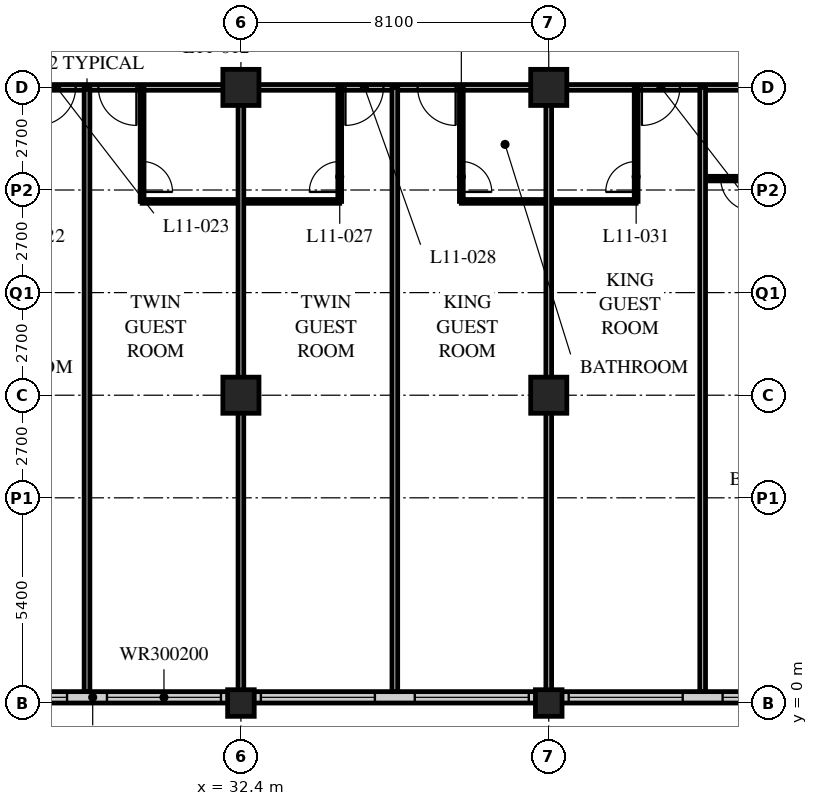
"""IFC4 building model, lengths in metres.
Left out: names, types, materials, properties, quantities, classifications, styles, units other than length and angle.
Written with IfcOpenShell. Run it as: python <this file> out.ifc"""

import sys

from ifc_helpers import new_model, si_unit, direction, frame, frame_2d, origin, origin_2d, place, context, subcontext, project, spatial, rectangle, hollow_rectangle, extrude, element, fill, save


model = new_model("IFC4")
c1 = context("Model", 3, precision=1e-05, world=origin(), true_north=direction((0.0, 1.0)))
c2 = subcontext(c1, "Body", "Model", "MODEL_VIEW")
j1 = project(units=[si_unit("LENGTHUNIT", "METRE"), si_unit("PLANEANGLEUNIT", "RADIAN")], contexts=[c1])
p1 = place(None, origin())
s1 = spatial("IfcSite", under=j1, at=p1, CompositionType="ELEMENT")
p2 = place(p1, origin())
s2 = spatial("IfcBuilding", under=s1, at=p2, CompositionType="ELEMENT")
p3 = place(p2, frame((0.0, 0.0, 50.0)))
s3 = spatial("IfcBuildingStorey", under=s2, at=p3, CompositionType="ELEMENT", Elevation=50.0)
p4 = place(p3, frame((32.4, 0.0, 0.0), z_axis=(0.0, 0.0, 1.0), x_axis=(1.0, 0.0, 0.0)))
e1 = element("IfcColumn", 1, at=p4, inside=s3, PredefinedType="COLUMN", context=c2, shape_type="SweptSolid", body=[
    extrude(hollow_rectangle(XDim=0.7, YDim=0.7, WallThickness=0.06, at=origin_2d()), origin(), (0.0, 0.0, 1.0), 3.4),
])
for number, where, z_axis, x_axis in (
    (2, (32.4, 8.1, 0.0), (0.0, 0.0, 1.0), (1.0, 0.0, 0.0)),
    (3, (32.4, 16.2, 0.0), (0.0, 0.0, 1.0), (1.0, 0.0, 0.0)),
):
    element("IfcColumn", number, at=place(p3, frame(where, z_axis=z_axis, x_axis=x_axis)), inside=s3, PredefinedType="COLUMN", context=c2, shape_type="SweptSolid", body=[
        extrude(hollow_rectangle(XDim=0.95, YDim=0.95, WallThickness=0.095, at=origin_2d()), origin(), (0.0, 0.0, 1.0), 3.4),
    ])
p5 = place(p3, frame((40.5, 0.0, 0.0), z_axis=(0.0, 0.0, 1.0), x_axis=(1.0, 0.0, 0.0)))
e4 = element("IfcColumn", 4, at=p5, inside=s3, PredefinedType="COLUMN", context=c2, shape_type="SweptSolid", body=[
    extrude(hollow_rectangle(XDim=0.7, YDim=0.7, WallThickness=0.06, at=origin_2d()), origin(), (0.0, 0.0, 1.0), 3.4),
])
for number, where, z_axis, x_axis in (
    (5, (40.5, 8.1, 0.0), (0.0, 0.0, 1.0), (1.0, 0.0, 0.0)),
    (6, (40.5, 16.2, 0.0), (0.0, 0.0, 1.0), (1.0, 0.0, 0.0)),
):
    element("IfcColumn", number, at=place(p3, frame(where, z_axis=z_axis, x_axis=x_axis)), inside=s3, PredefinedType="COLUMN", context=c2, shape_type="SweptSolid", body=[
        extrude(hollow_rectangle(XDim=0.95, YDim=0.95, WallThickness=0.095, at=origin_2d()), origin(), (0.0, 0.0, 1.0), 3.4),
    ])
p6 = place(p3, frame((8.4, 0.15, 0.0), z_axis=(0.0, 0.0, 1.0), x_axis=(1.0, 0.0, 0.0)))
e7 = element("IfcWall", 7, at=p6, inside=s3, PredefinedType="SOLIDWALL", context=c2, shape_type="SweptSolid", body=[
    extrude(rectangle(XDim=40.2, YDim=0.3, at=frame_2d((20.1, 0.0))), origin(), (0.0, 0.0, 1.0), 3.19),
])
p7 = place(p6, frame((0.225, 0.0, 0.9)))
e8 = element("IfcOpeningElement", 8, at=p7, cuts=e7, PredefinedType="OPENING", context=c2, shape_type="SweptSolid", body=[
    extrude(rectangle(XDim=3.0, YDim=2.0, at=frame_2d((1.5, 1.0))), frame((0.0, 0.16, 0.0), z_axis=(0.0, -1.0, 0.0), x_axis=(1.0, 0.0, 0.0)), (0.0, 0.0, 1.0), 0.32),
])
p8 = place(p6, frame((4.275, 0.0, 0.9)))
e9 = element("IfcOpeningElement", 9, at=p8, cuts=e7, PredefinedType="OPENING", context=c2, shape_type="SweptSolid", body=[
    extrude(rectangle(XDim=3.0, YDim=2.0, at=frame_2d((1.5, 1.0))), frame((0.0, 0.16, 0.0), z_axis=(0.0, -1.0, 0.0), x_axis=(1.0, 0.0, 0.0)), (0.0, 0.0, 1.0), 0.32),
])
p9 = place(p6, frame((8.325, 0.0, 0.9)))
e10 = element("IfcOpeningElement", 10, at=p9, cuts=e7, PredefinedType="OPENING", context=c2, shape_type="SweptSolid", body=[
    extrude(rectangle(XDim=3.0, YDim=2.0, at=frame_2d((1.5, 1.0))), frame((0.0, 0.16, 0.0), z_axis=(0.0, -1.0, 0.0), x_axis=(1.0, 0.0, 0.0)), (0.0, 0.0, 1.0), 0.32),
])
p10 = place(p6, frame((12.375, 0.0, 0.9)))
e11 = element("IfcOpeningElement", 11, at=p10, cuts=e7, PredefinedType="OPENING", context=c2, shape_type="SweptSolid", body=[
    extrude(rectangle(XDim=3.0, YDim=2.0, at=frame_2d((1.5, 1.0))), frame((0.0, 0.16, 0.0), z_axis=(0.0, -1.0, 0.0), x_axis=(1.0, 0.0, 0.0)), (0.0, 0.0, 1.0), 0.32),
])
p11 = place(p6, frame((16.425, 0.0, 0.9)))
e12 = element("IfcOpeningElement", 12, at=p11, cuts=e7, PredefinedType="OPENING", context=c2, shape_type="SweptSolid", body=[
    extrude(rectangle(XDim=3.0, YDim=2.0, at=frame_2d((1.5, 1.0))), frame((0.0, 0.16, 0.0), z_axis=(0.0, -1.0, 0.0), x_axis=(1.0, 0.0, 0.0)), (0.0, 0.0, 1.0), 0.32),
])
p12 = place(p6, frame((20.475, 0.0, 0.9)))
e13 = element("IfcOpeningElement", 13, at=p12, cuts=e7, PredefinedType="OPENING", context=c2, shape_type="SweptSolid", body=[
    extrude(rectangle(XDim=3.0, YDim=2.0, at=frame_2d((1.5, 1.0))), frame((0.0, 0.16, 0.0), z_axis=(0.0, -1.0, 0.0), x_axis=(1.0, 0.0, 0.0)), (0.0, 0.0, 1.0), 0.32),
])
p13 = place(p6, frame((24.525, 0.0, 0.9)))
e14 = element("IfcOpeningElement", 14, at=p13, cuts=e7, PredefinedType="OPENING", context=c2, shape_type="SweptSolid", body=[
    extrude(rectangle(XDim=3.0, YDim=2.0, at=frame_2d((1.5, 1.0))), frame((0.0, 0.16, 0.0), z_axis=(0.0, -1.0, 0.0), x_axis=(1.0, 0.0, 0.0)), (0.0, 0.0, 1.0), 0.32),
])
p14 = place(p6, frame((28.575, 0.0, 0.9)))
e15 = element("IfcOpeningElement", 15, at=p14, cuts=e7, PredefinedType="OPENING", context=c2, shape_type="SweptSolid", body=[
    extrude(rectangle(XDim=3.0, YDim=2.0, at=frame_2d((1.5, 1.0))), frame((0.0, 0.16, 0.0), z_axis=(0.0, -1.0, 0.0), x_axis=(1.0, 0.0, 0.0)), (0.0, 0.0, 1.0), 0.32),
])
p15 = place(p6, frame((32.625, 0.0, 0.9)))
e16 = element("IfcOpeningElement", 16, at=p15, cuts=e7, PredefinedType="OPENING", context=c2, shape_type="SweptSolid", body=[
    extrude(rectangle(XDim=3.0, YDim=2.0, at=frame_2d((1.5, 1.0))), frame((0.0, 0.16, 0.0), z_axis=(0.0, -1.0, 0.0), x_axis=(1.0, 0.0, 0.0)), (0.0, 0.0, 1.0), 0.32),
])
p16 = place(p6, frame((36.675, 0.0, 0.9)))
e17 = element("IfcOpeningElement", 17, at=p16, cuts=e7, PredefinedType="OPENING", context=c2, shape_type="SweptSolid", body=[
    extrude(rectangle(XDim=3.0, YDim=2.0, at=frame_2d((1.5, 1.0))), frame((0.0, 0.16, 0.0), z_axis=(0.0, -1.0, 0.0), x_axis=(1.0, 0.0, 0.0)), (0.0, 0.0, 1.0), 0.32),
])
p17 = place(p3, frame((8.1, 16.2, 0.0), z_axis=(0.0, 0.0, 1.0), x_axis=(1.0, 0.0, 0.0)))
e18 = element("IfcWall", 18, at=p17, inside=s3, PredefinedType="PARTITIONING", context=c2, shape_type="SweptSolid", body=[
    extrude(rectangle(XDim=40.5, YDim=0.15, at=frame_2d((20.25, 0.0))), origin(), (0.0, 0.0, 1.0), 2.578),
])
p18 = place(p17, frame((4.35, 0.0, 0.0)))
e19 = element("IfcOpeningElement", 19, at=p18, cuts=e18, PredefinedType="OPENING", context=c2, shape_type="SweptSolid", body=[
    extrude(rectangle(XDim=1.0, YDim=2.1, at=frame_2d((0.5, 1.05))), frame((0.0, 0.085, 0.0), z_axis=(0.0, -1.0, 0.0), x_axis=(1.0, 0.0, 0.0)), (0.0, 0.0, 1.0), 0.17),
])
p19 = place(p17, frame((10.85, 0.0, 0.0)))
e20 = element("IfcOpeningElement", 20, at=p19, cuts=e18, PredefinedType="OPENING", context=c2, shape_type="SweptSolid", body=[
    extrude(rectangle(XDim=1.0, YDim=2.1, at=frame_2d((0.5, 1.05))), frame((0.0, 0.085, 0.0), z_axis=(0.0, -1.0, 0.0), x_axis=(1.0, 0.0, 0.0)), (0.0, 0.0, 1.0), 0.17),
])
p20 = place(p17, frame((12.75, 0.0, 0.0)))
e21 = element("IfcOpeningElement", 21, at=p20, cuts=e18, PredefinedType="OPENING", context=c2, shape_type="SweptSolid", body=[
    extrude(rectangle(XDim=1.0, YDim=2.1, at=frame_2d((0.5, 1.05))), frame((0.0, 0.085, 0.0), z_axis=(0.0, -1.0, 0.0), x_axis=(1.0, 0.0, 0.0)), (0.0, 0.0, 1.0), 0.17),
])
p21 = place(p17, frame((18.95, 0.0, 0.0)))
e22 = element("IfcOpeningElement", 22, at=p21, cuts=e18, PredefinedType="OPENING", context=c2, shape_type="SweptSolid", body=[
    extrude(rectangle(XDim=1.0, YDim=2.1, at=frame_2d((0.5, 1.05))), frame((0.0, 0.085, 0.0), z_axis=(0.0, -1.0, 0.0), x_axis=(1.0, 0.0, 0.0)), (0.0, 0.0, 1.0), 0.17),
])
p22 = place(p17, frame((20.55, 0.0, 0.0)))
e23 = element("IfcOpeningElement", 23, at=p22, cuts=e18, PredefinedType="OPENING", context=c2, shape_type="SweptSolid", body=[
    extrude(rectangle(XDim=1.0, YDim=2.1, at=frame_2d((0.5, 1.05))), frame((0.0, 0.085, 0.0), z_axis=(0.0, -1.0, 0.0), x_axis=(1.0, 0.0, 0.0)), (0.0, 0.0, 1.0), 0.17),
])
p23 = place(p17, frame((27.05, 0.0, 0.0)))
e24 = element("IfcOpeningElement", 24, at=p23, cuts=e18, PredefinedType="OPENING", context=c2, shape_type="SweptSolid", body=[
    extrude(rectangle(XDim=1.0, YDim=2.1, at=frame_2d((0.5, 1.05))), frame((0.0, 0.085, 0.0), z_axis=(0.0, -1.0, 0.0), x_axis=(1.0, 0.0, 0.0)), (0.0, 0.0, 1.0), 0.17),
])
p24 = place(p17, frame((28.95, 0.0, 0.0)))
e25 = element("IfcOpeningElement", 25, at=p24, cuts=e18, PredefinedType="OPENING", context=c2, shape_type="SweptSolid", body=[
    extrude(rectangle(XDim=1.0, YDim=2.1, at=frame_2d((0.5, 1.05))), frame((0.0, 0.085, 0.0), z_axis=(0.0, -1.0, 0.0), x_axis=(1.0, 0.0, 0.0)), (0.0, 0.0, 1.0), 0.17),
])
p25 = place(p17, frame((34.85, 0.0, 0.0)))
e26 = element("IfcOpeningElement", 26, at=p25, cuts=e18, PredefinedType="OPENING", context=c2, shape_type="SweptSolid", body=[
    extrude(rectangle(XDim=1.0, YDim=2.1, at=frame_2d((0.5, 1.05))), frame((0.0, 0.085, 0.0), z_axis=(0.0, -1.0, 0.0), x_axis=(1.0, 0.0, 0.0)), (0.0, 0.0, 1.0), 0.17),
])
p26 = place(p17, frame((1.525, 0.0, 0.0)))
e27 = element("IfcOpeningElement", 27, at=p26, cuts=e18, PredefinedType="OPENING", context=c2, shape_type="SweptSolid", body=[
    extrude(rectangle(XDim=1.0, YDim=2.1, at=frame_2d((0.5, 1.05))), frame((0.0, 0.085, 0.0), z_axis=(0.0, -1.0, 0.0), x_axis=(1.0, 0.0, 0.0)), (0.0, 0.0, 1.0), 0.17),
])
p27 = place(p17, frame((37.975, 0.0, 0.0)))
e28 = element("IfcOpeningElement", 28, at=p27, cuts=e18, PredefinedType="OPENING", context=c2, shape_type="SweptSolid", body=[
    extrude(rectangle(XDim=1.0, YDim=2.1, at=frame_2d((0.5, 1.05))), frame((0.0, 0.085, 0.0), z_axis=(0.0, -1.0, 0.0), x_axis=(1.0, 0.0, 0.0)), (0.0, 0.0, 1.0), 0.17),
])
p28 = place(p3, frame((28.35, 16.2, 0.0), z_axis=(0.0, 0.0, 1.0), x_axis=(0.0, -1.0, 0.0)))
e29 = element("IfcWall", 29, at=p28, inside=s3, PredefinedType="PARTITIONING", context=c2, shape_type="SweptSolid", body=[
    extrude(rectangle(XDim=15.9, YDim=0.15, at=frame_2d((7.95, 0.0))), origin(), (0.0, 0.0, 1.0), 3.19),
])
p29 = place(p3, frame((29.8, 13.2, 0.0), z_axis=(0.0, 0.0, 1.0), x_axis=(1.0, 0.0, 0.0)))
e30 = element("IfcWall", 30, at=p29, inside=s3, PredefinedType="PARTITIONING", context=c2, shape_type="SweptSolid", body=[
    extrude(rectangle(XDim=5.2, YDim=0.1, at=frame_2d((2.6, 0.0))), origin(), (0.0, 0.0, 1.0), 3.19),
])
p30 = place(p3, frame((29.8, 16.2, 0.0), z_axis=(0.0, 0.0, 1.0), x_axis=(0.0, -1.0, 0.0)))
e31 = element("IfcWall", 31, at=p30, inside=s3, PredefinedType="PARTITIONING", context=c2, shape_type="SweptSolid", body=[
    extrude(rectangle(XDim=3.0, YDim=0.1, at=frame_2d((1.5, 0.0))), origin(), (0.0, 0.0, 1.0), 3.19),
])
p31 = place(p30, frame((1.95, 0.0, 0.0)))
e32 = element("IfcOpeningElement", 32, at=p31, cuts=e31, PredefinedType="OPENING", context=c2, shape_type="SweptSolid", body=[
    extrude(rectangle(XDim=0.8, YDim=2.1, at=frame_2d((0.4, 1.05))), frame((0.0, 0.06, 0.0), z_axis=(0.0, -1.0, 0.0), x_axis=(1.0, 0.0, 0.0)), (0.0, 0.0, 1.0), 0.12),
])
p32 = place(p3, frame((32.4, 16.2, 0.0), z_axis=(0.0, 0.0, 1.0), x_axis=(0.0, -1.0, 0.0)))
e33 = element("IfcWall", 33, at=p32, inside=s3, PredefinedType="PARTITIONING", context=c2, shape_type="SweptSolid", body=[
    extrude(rectangle(XDim=15.9, YDim=0.15, at=frame_2d((7.95, 0.0))), origin(), (0.0, 0.0, 1.0), 2.578),
])
p33 = place(p3, frame((35.0, 16.2, 0.0), z_axis=(0.0, 0.0, 1.0), x_axis=(0.0, -1.0, 0.0)))
e34 = element("IfcWall", 34, at=p33, inside=s3, PredefinedType="PARTITIONING", context=c2, shape_type="SweptSolid", body=[
    extrude(rectangle(XDim=3.0, YDim=0.1, at=frame_2d((1.5, 0.0))), origin(), (0.0, 0.0, 1.0), 3.19),
])
p34 = place(p33, frame((1.95, 0.0, 0.0)))
e35 = element("IfcOpeningElement", 35, at=p34, cuts=e34, PredefinedType="OPENING", context=c2, shape_type="SweptSolid", body=[
    extrude(rectangle(XDim=0.8, YDim=2.1, at=frame_2d((0.4, 1.05))), frame((0.0, 0.06, 0.0), z_axis=(0.0, -1.0, 0.0), x_axis=(1.0, 0.0, 0.0)), (0.0, 0.0, 1.0), 0.12),
])
p35 = place(p3, frame((36.45, 16.2, 0.0), z_axis=(0.0, 0.0, 1.0), x_axis=(0.0, -1.0, 0.0)))
e36 = element("IfcWall", 36, at=p35, inside=s3, PredefinedType="PARTITIONING", context=c2, shape_type="SweptSolid", body=[
    extrude(rectangle(XDim=15.9, YDim=0.15, at=frame_2d((7.95, 0.0))), origin(), (0.0, 0.0, 1.0), 3.19),
])
p36 = place(p3, frame((38.2, 13.2, 0.0), z_axis=(0.0, 0.0, 1.0), x_axis=(1.0, 0.0, 0.0)))
e37 = element("IfcWall", 37, at=p36, inside=s3, PredefinedType="PARTITIONING", context=c2, shape_type="SweptSolid", body=[
    extrude(rectangle(XDim=4.6, YDim=0.1, at=frame_2d((2.3, 0.0))), origin(), (0.0, 0.0, 1.0), 3.19),
])
p37 = place(p3, frame((38.2, 16.2, 0.0), z_axis=(0.0, 0.0, 1.0), x_axis=(0.0, -1.0, 0.0)))
e38 = element("IfcWall", 38, at=p37, inside=s3, PredefinedType="PARTITIONING", context=c2, shape_type="SweptSolid", body=[
    extrude(rectangle(XDim=3.0, YDim=0.1, at=frame_2d((1.5, 0.0))), origin(), (0.0, 0.0, 1.0), 3.19),
])
p38 = place(p37, frame((1.95, 0.0, 0.0)))
e39 = element("IfcOpeningElement", 39, at=p38, cuts=e38, PredefinedType="OPENING", context=c2, shape_type="SweptSolid", body=[
    extrude(rectangle(XDim=0.8, YDim=2.1, at=frame_2d((0.4, 1.05))), frame((0.0, 0.06, 0.0), z_axis=(0.0, -1.0, 0.0), x_axis=(1.0, 0.0, 0.0)), (0.0, 0.0, 1.0), 0.12),
])
p39 = place(p3, frame((40.5, 16.2, 0.0), z_axis=(0.0, 0.0, 1.0), x_axis=(0.0, -1.0, 0.0)))
e40 = element("IfcWall", 40, at=p39, inside=s3, PredefinedType="PARTITIONING", context=c2, shape_type="SweptSolid", body=[
    extrude(rectangle(XDim=15.9, YDim=0.15, at=frame_2d((7.95, 0.0))), origin(), (0.0, 0.0, 1.0), 2.578),
])
p40 = place(p3, frame((42.8, 16.2, 0.0), z_axis=(0.0, 0.0, 1.0), x_axis=(0.0, -1.0, 0.0)))
e41 = element("IfcWall", 41, at=p40, inside=s3, PredefinedType="PARTITIONING", context=c2, shape_type="SweptSolid", body=[
    extrude(rectangle(XDim=3.0, YDim=0.1, at=frame_2d((1.5, 0.0))), origin(), (0.0, 0.0, 1.0), 3.19),
])
p41 = place(p40, frame((1.95, 0.0, 0.0)))
e42 = element("IfcOpeningElement", 42, at=p41, cuts=e41, PredefinedType="OPENING", context=c2, shape_type="SweptSolid", body=[
    extrude(rectangle(XDim=0.8, YDim=2.1, at=frame_2d((0.4, 1.05))), frame((0.0, 0.06, 0.0), z_axis=(0.0, -1.0, 0.0), x_axis=(1.0, 0.0, 0.0)), (0.0, 0.0, 1.0), 0.12),
])
p42 = place(p3, frame((44.55, 13.8, 0.0), z_axis=(0.0, 0.0, 1.0), x_axis=(1.0, 0.0, 0.0)))
e43 = element("IfcWall", 43, at=p42, inside=s3, PredefinedType="PARTITIONING", context=c2, shape_type="SweptSolid", body=[
    extrude(rectangle(XDim=8.05, YDim=0.12, at=frame_2d((4.025, 0.0))), origin(), (0.0, 0.0, 1.0), 3.19),
])
p43 = place(p42, frame((0.475, 0.0, 0.0)))
e44 = element("IfcOpeningElement", 44, at=p43, cuts=e43, PredefinedType="OPENING", context=c2, shape_type="SweptSolid", body=[
    extrude(rectangle(XDim=0.85, YDim=2.1, at=frame_2d((0.425, 1.05))), frame((0.0, 0.07, 0.0), z_axis=(0.0, -1.0, 0.0), x_axis=(1.0, 0.0, 0.0)), (0.0, 0.0, 1.0), 0.14),
])
p44 = place(p42, frame((4.325, 0.0, 0.0)))
e45 = element("IfcOpeningElement", 45, at=p44, cuts=e43, PredefinedType="OPENING", context=c2, shape_type="SweptSolid", body=[
    extrude(rectangle(XDim=0.85, YDim=2.1, at=frame_2d((0.425, 1.05))), frame((0.0, 0.07, 0.0), z_axis=(0.0, -1.0, 0.0), x_axis=(1.0, 0.0, 0.0)), (0.0, 0.0, 1.0), 0.14),
])
p45 = place(p3, frame((44.55, 16.2, 0.0), z_axis=(0.0, 0.0, 1.0), x_axis=(0.0, -1.0, 0.0)))
e46 = element("IfcWall", 46, at=p45, inside=s3, PredefinedType="PARTITIONING", context=c2, shape_type="SweptSolid", body=[
    extrude(rectangle(XDim=15.9, YDim=0.15, at=frame_2d((7.95, 0.0))), origin(), (0.0, 0.0, 1.0), 3.19),
])
p46 = place(p11, origin())
e47 = element("IfcWindow", 47, at=p46, inside=s3, PartitioningType="SINGLE_PANEL", PredefinedType="WINDOW", context=c2, shape_type="SweptSolid", body=[
    extrude(rectangle(XDim=3.0, YDim=2.0, at=frame_2d((1.5, 1.0))), frame((0.0, 0.03, 0.0), z_axis=(0.0, -1.0, 0.0), x_axis=(1.0, 0.0, 0.0)), (0.0, 0.0, 1.0), 0.06),
])
fill(e12, e47)
p47 = place(p12, origin())
e48 = element("IfcWindow", 48, at=p47, inside=s3, PartitioningType="SINGLE_PANEL", PredefinedType="WINDOW", context=c2, shape_type="SweptSolid", body=[
    extrude(rectangle(XDim=3.0, YDim=2.0, at=frame_2d((1.5, 1.0))), frame((0.0, 0.03, 0.0), z_axis=(0.0, -1.0, 0.0), x_axis=(1.0, 0.0, 0.0)), (0.0, 0.0, 1.0), 0.06),
])
fill(e13, e48)
p48 = place(p13, origin())
e49 = element("IfcWindow", 49, at=p48, inside=s3, PartitioningType="SINGLE_PANEL", PredefinedType="WINDOW", context=c2, shape_type="SweptSolid", body=[
    extrude(rectangle(XDim=3.0, YDim=2.0, at=frame_2d((1.5, 1.0))), frame((0.0, 0.03, 0.0), z_axis=(0.0, -1.0, 0.0), x_axis=(1.0, 0.0, 0.0)), (0.0, 0.0, 1.0), 0.06),
])
fill(e14, e49)
p49 = place(p14, origin())
e50 = element("IfcWindow", 50, at=p49, inside=s3, PartitioningType="SINGLE_PANEL", PredefinedType="WINDOW", context=c2, shape_type="SweptSolid", body=[
    extrude(rectangle(XDim=3.0, YDim=2.0, at=frame_2d((1.5, 1.0))), frame((0.0, 0.03, 0.0), z_axis=(0.0, -1.0, 0.0), x_axis=(1.0, 0.0, 0.0)), (0.0, 0.0, 1.0), 0.06),
])
fill(e15, e50)
p50 = place(p15, origin())
e51 = element("IfcWindow", 51, at=p50, inside=s3, PartitioningType="SINGLE_PANEL", PredefinedType="WINDOW", context=c2, shape_type="SweptSolid", body=[
    extrude(rectangle(XDim=3.0, YDim=2.0, at=frame_2d((1.5, 1.0))), frame((0.0, 0.03, 0.0), z_axis=(0.0, -1.0, 0.0), x_axis=(1.0, 0.0, 0.0)), (0.0, 0.0, 1.0), 0.06),
])
fill(e16, e51)
p51 = place(p16, origin())
e52 = element("IfcWindow", 52, at=p51, inside=s3, PartitioningType="SINGLE_PANEL", PredefinedType="WINDOW", context=c2, shape_type="SweptSolid", body=[
    extrude(rectangle(XDim=3.0, YDim=2.0, at=frame_2d((1.5, 1.0))), frame((0.0, 0.03, 0.0), z_axis=(0.0, -1.0, 0.0), x_axis=(1.0, 0.0, 0.0)), (0.0, 0.0, 1.0), 0.06),
])
fill(e17, e52)
p52 = place(p21, origin())
e53 = element("IfcDoor", 53, at=p52, inside=s3, OperationType="SINGLE_SWING_RIGHT", PredefinedType="DOOR", context=c2, shape_type="SweptSolid", body=[
    extrude(rectangle(XDim=1.0, YDim=2.1, at=frame_2d((0.5, 1.05))), frame((0.0, 0.025, 0.0), z_axis=(0.0, -1.0, 0.0), x_axis=(1.0, 0.0, 0.0)), (0.0, 0.0, 1.0), 0.05),
])
fill(e22, e53)
p53 = place(p31, origin())
e54 = element("IfcDoor", 54, at=p53, inside=s3, OperationType="SINGLE_SWING_RIGHT", PredefinedType="DOOR", context=c2, shape_type="SweptSolid", body=[
    extrude(rectangle(XDim=0.8, YDim=2.1, at=frame_2d((0.4, 1.05))), frame((0.0, 0.025, 0.0), z_axis=(0.0, -1.0, 0.0), x_axis=(1.0, 0.0, 0.0)), (0.0, 0.0, 1.0), 0.05),
])
fill(e32, e54)
p54 = place(p22, origin())
e55 = element("IfcDoor", 55, at=p54, inside=s3, OperationType="SINGLE_SWING_LEFT", PredefinedType="DOOR", context=c2, shape_type="SweptSolid", body=[
    extrude(rectangle(XDim=1.0, YDim=2.1, at=frame_2d((0.5, 1.05))), frame((0.0, 0.025, 0.0), z_axis=(0.0, -1.0, 0.0), x_axis=(1.0, 0.0, 0.0)), (0.0, 0.0, 1.0), 0.05),
])
fill(e23, e55)
p55 = place(p34, origin())
e56 = element("IfcDoor", 56, at=p55, inside=s3, OperationType="SINGLE_SWING_LEFT", PredefinedType="DOOR", context=c2, shape_type="SweptSolid", body=[
    extrude(rectangle(XDim=0.8, YDim=2.1, at=frame_2d((0.4, 1.05))), frame((0.0, 0.025, 0.0), z_axis=(0.0, -1.0, 0.0), x_axis=(1.0, 0.0, 0.0)), (0.0, 0.0, 1.0), 0.05),
])
fill(e35, e56)
p56 = place(p23, origin())
e57 = element("IfcDoor", 57, at=p56, inside=s3, OperationType="SINGLE_SWING_RIGHT", PredefinedType="DOOR", context=c2, shape_type="SweptSolid", body=[
    extrude(rectangle(XDim=1.0, YDim=2.1, at=frame_2d((0.5, 1.05))), frame((0.0, 0.025, 0.0), z_axis=(0.0, -1.0, 0.0), x_axis=(1.0, 0.0, 0.0)), (0.0, 0.0, 1.0), 0.05),
])
fill(e24, e57)
p57 = place(p38, origin())
e58 = element("IfcDoor", 58, at=p57, inside=s3, OperationType="SINGLE_SWING_RIGHT", PredefinedType="DOOR", context=c2, shape_type="SweptSolid", body=[
    extrude(rectangle(XDim=0.8, YDim=2.1, at=frame_2d((0.4, 1.05))), frame((0.0, 0.025, 0.0), z_axis=(0.0, -1.0, 0.0), x_axis=(1.0, 0.0, 0.0)), (0.0, 0.0, 1.0), 0.05),
])
fill(e39, e58)
p58 = place(p24, origin())
e59 = element("IfcDoor", 59, at=p58, inside=s3, OperationType="SINGLE_SWING_LEFT", PredefinedType="DOOR", context=c2, shape_type="SweptSolid", body=[
    extrude(rectangle(XDim=1.0, YDim=2.1, at=frame_2d((0.5, 1.05))), frame((0.0, 0.025, 0.0), z_axis=(0.0, -1.0, 0.0), x_axis=(1.0, 0.0, 0.0)), (0.0, 0.0, 1.0), 0.05),
])
fill(e25, e59)
p59 = place(p41, origin())
e60 = element("IfcDoor", 60, at=p59, inside=s3, OperationType="SINGLE_SWING_LEFT", PredefinedType="DOOR", context=c2, shape_type="SweptSolid", body=[
    extrude(rectangle(XDim=0.8, YDim=2.1, at=frame_2d((0.4, 1.05))), frame((0.0, 0.025, 0.0), z_axis=(0.0, -1.0, 0.0), x_axis=(1.0, 0.0, 0.0)), (0.0, 0.0, 1.0), 0.05),
])
fill(e42, e60)
p60 = place(p25, origin())
e61 = element("IfcDoor", 61, at=p60, inside=s3, OperationType="SINGLE_SWING_RIGHT", PredefinedType="DOOR", context=c2, shape_type="SweptSolid", body=[
    extrude(rectangle(XDim=1.0, YDim=2.1, at=frame_2d((0.5, 1.05))), frame((0.0, 0.025, 0.0), z_axis=(0.0, -1.0, 0.0), x_axis=(1.0, 0.0, 0.0)), (0.0, 0.0, 1.0), 0.05),
])
fill(e26, e61)
p61 = place(p43, origin())
e62 = element("IfcDoor", 62, at=p61, inside=s3, OperationType="SINGLE_SWING_LEFT", PredefinedType="DOOR", context=c2, shape_type="SweptSolid", body=[
    extrude(rectangle(XDim=0.85, YDim=2.1, at=frame_2d((0.425, 1.05))), frame((0.0, 0.025, 0.0), z_axis=(0.0, -1.0, 0.0), x_axis=(1.0, 0.0, 0.0)), (0.0, 0.0, 1.0), 0.05),
])
fill(e44, e62)
save(model, sys.argv[1])
